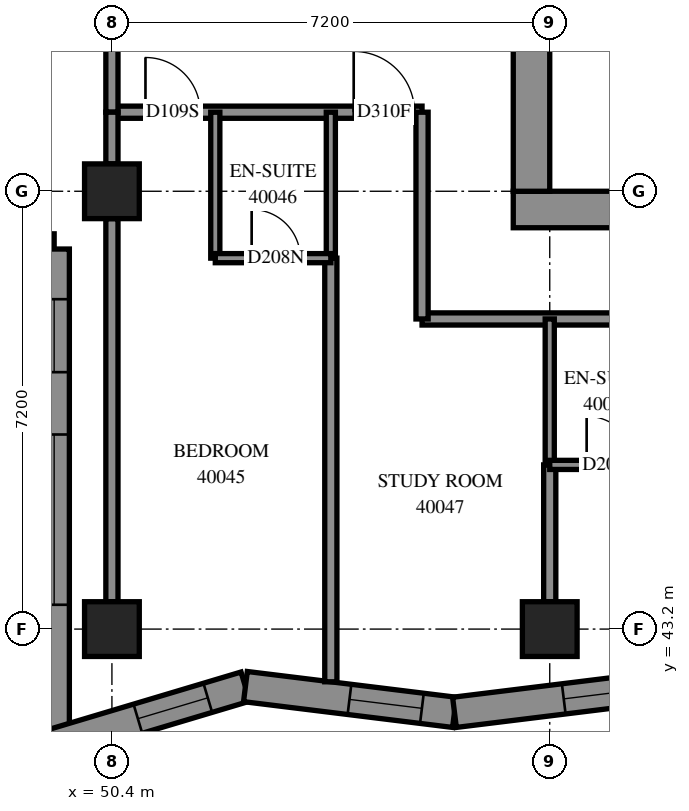
"""IFC4 building model, lengths in metres.
Left out: names, types, materials, properties, quantities, classifications, styles, units other than length and angle.
Written with IfcOpenShell. Run it as: python <this file> out.ifc"""

import sys

from ifc_helpers import new_model, si_unit, direction, frame, frame_2d, origin, origin_2d, place, context, subcontext, project, spatial, polyline, rectangle, outline, extrude, element, fill, save


model = new_model("IFC4")
c1 = context("Model", 3, precision=1e-05, world=origin(), true_north=direction((0.0, 1.0)))
c2 = subcontext(c1, "Body", "Model", "MODEL_VIEW")
j1 = project(units=[si_unit("LENGTHUNIT", "METRE"), si_unit("PLANEANGLEUNIT", "RADIAN")], contexts=[c1])
p1 = place(None, origin())
s1 = spatial("IfcSite", under=j1, at=p1, CompositionType="ELEMENT")
p2 = place(p1, origin())
s2 = spatial("IfcBuilding", under=s1, at=p2, CompositionType="ELEMENT")
p3 = place(p2, frame((0.0, 0.0, 149.0)))
s3 = spatial("IfcBuildingStorey", under=s2, at=p3, CompositionType="ELEMENT", Elevation=149.0)
for number, where, z_axis, x_axis in (
    (1, (50.4, 43.2, 0.0), (0.0, 0.0, 1.0), (1.0, 0.0, 0.0)),
    (2, (50.4, 50.4, 0.0), (0.0, 0.0, 1.0), (1.0, 0.0, 0.0)),
    (3, (57.6, 43.2, 0.0), (0.0, 0.0, 1.0), (1.0, 0.0, 0.0)),
):
    element("IfcColumn", number, at=place(p3, frame(where, z_axis=z_axis, x_axis=x_axis)), inside=s3, PredefinedType="COLUMN", context=c2, shape_type="SweptSolid", body=[
        extrude(rectangle(XDim=0.9, YDim=0.9, at=origin_2d()), origin(), (0.0, 0.0, 1.0), 3.1),
    ])
p4 = place(p3, frame((57.0, 50.1, -0.3), z_axis=(0.0, 0.0, 1.0), x_axis=(1.0, 0.0, 0.0)))
e4 = element("IfcWall", 4, at=p4, inside=s3, PredefinedType="SHEAR", context=c2, shape_type="SweptSolid", body=[
    extrude(rectangle(XDim=15.6, YDim=0.6, at=frame_2d((7.8, 0.0))), origin(), (0.0, 0.0, 1.0), 2.7),
])
p5 = place(p3, frame((57.3, 50.4, -0.3), z_axis=(0.0, 0.0, 1.0), x_axis=(0.0, 1.0, 0.0)))
e5 = element("IfcWall", 5, at=p5, inside=s3, PredefinedType="SHEAR", context=c2, shape_type="SweptSolid", body=[
    extrude(rectangle(XDim=14.4, YDim=0.6, at=frame_2d((7.2, 0.0))), origin(), (0.0, 0.0, 1.0), 2.7),
])
p6 = place(p5, frame((4.55, 0.0, 0.3)))
e6 = element("IfcOpeningElement", 6, at=p6, cuts=e5, PredefinedType="OPENING", context=c2, shape_type="SweptSolid", body=[
    extrude(rectangle(XDim=1.1, YDim=2.1, at=frame_2d((0.55, 1.05))), frame((0.0, 0.31, 0.0), z_axis=(0.0, -1.0, 0.0), x_axis=(1.0, 0.0, 0.0)), (0.0, 0.0, 1.0), 0.62),
])
p7 = place(p5, frame((11.35, 0.0, 0.3)))
e7 = element("IfcOpeningElement", 7, at=p7, cuts=e5, PredefinedType="OPENING", context=c2, shape_type="SweptSolid", body=[
    extrude(rectangle(XDim=1.1, YDim=2.1, at=frame_2d((0.55, 1.05))), frame((0.0, 0.31, 0.0), z_axis=(0.0, -1.0, 0.0), x_axis=(1.0, 0.0, 0.0)), (0.0, 0.0, 1.0), 0.62),
])
p8 = place(p3, frame((42.25, 49.45, 0.0), z_axis=(0.0, 0.0, 1.0), x_axis=(1.0, 0.0, 0.0)))
e8 = element("IfcWall", 8, at=p8, inside=s3, PredefinedType="SOLIDWALL", context=c2, shape_type="SweptSolid", body=[
    extrude(outline(polyline([(-0.25, -0.25), (6.95, -0.25), (7.45, 0.25), (0.25, 0.25), (-0.25, -0.25)])), origin(), (0.0, 0.0, 1.0), 3.1),
])
p9 = place(p8, frame((1.35, 0.0, 0.45)))
e9 = element("IfcOpeningElement", 9, at=p9, cuts=e8, PredefinedType="OPENING", context=c2, shape_type="SweptSolid", body=[
    extrude(rectangle(XDim=2.8, YDim=2.5, at=frame_2d((1.4, 1.25))), frame((0.0, 0.26, 0.0), z_axis=(0.0, -1.0, 0.0), x_axis=(1.0, 0.0, 0.0)), (0.0, 0.0, 1.0), 0.52),
])
p10 = place(p8, frame((5.175, 0.0, 0.45)))
e10 = element("IfcOpeningElement", 10, at=p10, cuts=e8, PredefinedType="OPENING", context=c2, shape_type="SweptSolid", body=[
    extrude(rectangle(XDim=1.2, YDim=2.5, at=frame_2d((0.6, 1.25))), frame((0.0, 0.26, 0.0), z_axis=(0.0, -1.0, 0.0), x_axis=(1.0, 0.0, 0.0)), (0.0, 0.0, 1.0), 0.52),
])
p11 = place(p3, frame((49.45, 49.45, 0.0), z_axis=(0.0, 0.0, 1.0), x_axis=(0.0, -1.0, 0.0)))
e11 = element("IfcWall", 11, at=p11, inside=s3, PredefinedType="SOLIDWALL", context=c2, shape_type="SweptSolid", body=[
    extrude(outline(polyline([(0.25, -0.25), (8.471, -0.25), (7.8, 0.25), (-0.25, 0.25), (0.25, -0.25)])), origin(), (0.0, 0.0, 1.0), 3.1),
])
p12 = place(p11, frame((3.05, 0.0, 0.45)))
e12 = element("IfcOpeningElement", 12, at=p12, cuts=e11, PredefinedType="OPENING", context=c2, shape_type="SweptSolid", body=[
    extrude(rectangle(XDim=2.8, YDim=2.5, at=frame_2d((1.4, 1.25))), frame((0.0, 0.26, 0.0), z_axis=(0.0, -1.0, 0.0), x_axis=(1.0, 0.0, 0.0)), (0.0, 0.0, 1.0), 0.52),
])
p13 = place(p11, frame((0.825, 0.0, 0.45)))
e13 = element("IfcOpeningElement", 13, at=p13, cuts=e11, PredefinedType="OPENING", context=c2, shape_type="SweptSolid", body=[
    extrude(rectangle(XDim=1.2, YDim=2.5, at=frame_2d((0.6, 1.25))), frame((0.0, 0.26, 0.0), z_axis=(0.0, -1.0, 0.0), x_axis=(1.0, 0.0, 0.0)), (0.0, 0.0, 1.0), 0.52),
])
p14 = place(p3, frame((49.45, 41.315, 0.0), z_axis=(0.0, 0.0, 1.0), x_axis=(0.9581326082, 0.2863248246, 0.0)))
e14 = element("IfcWall", 14, at=p14, inside=s3, PredefinedType="SOLIDWALL", context=c2, shape_type="SweptSolid", body=[
    extrude(outline(polyline([(-0.336, -0.25), (3.23, -0.25), (3.335, 0.25), (0.336, 0.25), (-0.336, -0.25)])), origin(), (0.0, 0.0, 1.0), 3.1),
])
p15 = place(p14, frame((1.437, 0.0, 0.45)))
e15 = element("IfcOpeningElement", 15, at=p15, cuts=e14, PredefinedType="OPENING", context=c2, shape_type="SweptSolid", body=[
    extrude(rectangle(XDim=1.2, YDim=2.5, at=frame_2d((0.6, 1.25))), frame((0.0, 0.26, 0.0), z_axis=(0.0, -1.0, 0.0), x_axis=(1.0, 0.0, 0.0)), (0.0, 0.0, 1.0), 0.52),
])
p16 = place(p3, frame((52.595, 42.255, 0.0), z_axis=(0.0, 0.0, 1.0), x_axis=(0.9924948483, -0.1222864508, 0.0)))
e16 = element("IfcWall", 16, at=p16, inside=s3, PredefinedType="SOLIDWALL", context=c2, shape_type="SweptSolid", body=[
    extrude(outline(polyline([(0.052, -0.25), (3.495, -0.25), (3.433, 0.25), (-0.052, 0.25), (0.052, -0.25)])), origin(), (0.0, 0.0, 1.0), 3.1),
])
p17 = place(p16, frame((1.724, 0.0, 0.45)))
e17 = element("IfcOpeningElement", 17, at=p17, cuts=e16, PredefinedType="OPENING", context=c2, shape_type="SweptSolid", body=[
    extrude(rectangle(XDim=1.2, YDim=2.5, at=frame_2d((0.6, 1.25))), frame((0.0, 0.26, 0.0), z_axis=(0.0, -1.0, 0.0), x_axis=(1.0, 0.0, 0.0)), (0.0, 0.0, 1.0), 0.52),
])
p18 = place(p3, frame((56.033, 41.831, 0.0), z_axis=(0.0, 0.0, 1.0), x_axis=(0.9924939881, 0.122293432, 0.0)))
e18 = element("IfcWall", 18, at=p18, inside=s3, PredefinedType="SOLIDWALL", context=c2, shape_type="SweptSolid", body=[
    extrude(outline(polyline([(-0.031, -0.25), (3.412, -0.25), (3.473, 0.25), (0.031, 0.25), (-0.031, -0.25)])), origin(), (0.0, 0.0, 1.0), 3.1),
])
p19 = place(p18, frame((1.81, 0.0, 0.45)))
e19 = element("IfcOpeningElement", 19, at=p19, cuts=e18, PredefinedType="OPENING", context=c2, shape_type="SweptSolid", body=[
    extrude(rectangle(XDim=1.2, YDim=2.5, at=frame_2d((0.6, 1.25))), frame((0.0, 0.26, 0.0), z_axis=(0.0, -1.0, 0.0), x_axis=(1.0, 0.0, 0.0)), (0.0, 0.0, 1.0), 0.52),
])
p20 = place(p3, frame((55.5, 48.3, 0.0), z_axis=(0.0, 0.0, 1.0), x_axis=(1.0, 0.0, 0.0)))
e20 = element("IfcWall", 20, at=p20, inside=s3, PredefinedType="PARTITIONING", context=c2, shape_type="SweptSolid", body=[
    extrude(rectangle(XDim=18.974, YDim=0.2, at=frame_2d((9.487, 0.0))), origin(), (0.0, 0.0, 1.0), 3.1),
])
p21 = place(p20, frame((4.4, 0.0, 0.0)))
e21 = element("IfcOpeningElement", 21, at=p21, cuts=e20, PredefinedType="OPENING", context=c2, shape_type="SweptSolid", body=[
    extrude(rectangle(XDim=0.9, YDim=2.1, at=frame_2d((0.45, 1.05))), frame((0.0, 0.11, 0.0), z_axis=(0.0, -1.0, 0.0), x_axis=(1.0, 0.0, 0.0)), (0.0, 0.0, 1.0), 0.22),
])
p22 = place(p20, frame((6.1, 0.0, 0.0)))
e22 = element("IfcOpeningElement", 22, at=p22, cuts=e20, PredefinedType="OPENING", context=c2, shape_type="SweptSolid", body=[
    extrude(rectangle(XDim=0.9, YDim=2.1, at=frame_2d((0.45, 1.05))), frame((0.0, 0.11, 0.0), z_axis=(0.0, -1.0, 0.0), x_axis=(1.0, 0.0, 0.0)), (0.0, 0.0, 1.0), 0.22),
])
p23 = place(p20, frame((13.162, 0.0, 0.0)))
e23 = element("IfcOpeningElement", 23, at=p23, cuts=e20, PredefinedType="OPENING", context=c2, shape_type="SweptSolid", body=[
    extrude(rectangle(XDim=1.0, YDim=2.1, at=frame_2d((0.5, 1.05))), frame((0.0, 0.11, 0.0), z_axis=(0.0, -1.0, 0.0), x_axis=(1.0, 0.0, 0.0)), (0.0, 0.0, 1.0), 0.22),
])
p24 = place(p3, frame((54.0, 42.333, 0.0), z_axis=(0.0, 0.0, 1.0), x_axis=(0.0, 1.0, 0.0)))
e24 = element("IfcWall", 24, at=p24, inside=s3, PredefinedType="PARTITIONING", context=c2, shape_type="SweptSolid", body=[
    extrude(rectangle(XDim=6.967, YDim=0.2, at=frame_2d((3.483, 0.0))), origin(), (0.0, 0.0, 1.0), 3.1),
])
p25 = place(p3, frame((50.4, 43.65, 0.0), z_axis=(0.0, 0.0, 1.0), x_axis=(0.0, 1.0, 0.0)))
e25 = element("IfcWall", 25, at=p25, inside=s3, PredefinedType="PARTITIONING", context=c2, shape_type="SweptSolid", body=[
    extrude(rectangle(XDim=6.3, YDim=0.2, at=frame_2d((3.15, 0.0))), origin(), (0.0, 0.0, 1.0), 2.6),
])
p26 = place(p3, frame((50.4, 51.7, 0.0), z_axis=(0.0, 0.0, 1.0), x_axis=(1.0, 0.0, 0.0)))
e26 = element("IfcWall", 26, at=p26, inside=s3, PredefinedType="PARTITIONING", context=c2, shape_type="SweptSolid", body=[
    extrude(rectangle(XDim=5.1, YDim=0.2, at=frame_2d((2.55, 0.0))), origin(), (0.0, 0.0, 1.0), 3.1),
])
p27 = place(p26, frame((0.552, 0.0, 0.0)))
e27 = element("IfcOpeningElement", 27, at=p27, cuts=e26, PredefinedType="OPENING", context=c2, shape_type="SweptSolid", body=[
    extrude(rectangle(XDim=0.9, YDim=2.1, at=frame_2d((0.45, 1.05))), frame((0.0, 0.11, 0.0), z_axis=(0.0, -1.0, 0.0), x_axis=(1.0, 0.0, 0.0)), (0.0, 0.0, 1.0), 0.22),
])
p28 = place(p26, frame((3.976, 0.0, 0.0)))
e28 = element("IfcOpeningElement", 28, at=p28, cuts=e26, PredefinedType="OPENING", context=c2, shape_type="SweptSolid", body=[
    extrude(rectangle(XDim=1.0, YDim=2.1, at=frame_2d((0.5, 1.05))), frame((0.0, 0.11, 0.0), z_axis=(0.0, -1.0, 0.0), x_axis=(1.0, 0.0, 0.0)), (0.0, 0.0, 1.0), 0.22),
])
p29 = place(p3, frame((55.5, 48.3, 0.0), z_axis=(0.0, 0.0, 1.0), x_axis=(0.0, 1.0, 0.0)))
e29 = element("IfcWall", 29, at=p29, inside=s3, PredefinedType="PARTITIONING", context=c2, shape_type="SweptSolid", body=[
    extrude(rectangle(XDim=3.4, YDim=0.2, at=frame_2d((1.7, 0.0))), origin(), (0.0, 0.0, 1.0), 3.1),
])
for number, where, z_axis, x_axis in (
    (30, (52.1, 49.3, 0.0), (0.0, 0.0, 1.0), (0.0, 1.0, 0.0)),
    (31, (54.0, 49.3, 0.0), (0.0, 0.0, 1.0), (0.0, 1.0, 0.0)),
    (32, (57.6, 45.9, 0.0), (0.0, 0.0, 1.0), (0.0, 1.0, 0.0)),
):
    element("IfcWall", number, at=place(p3, frame(where, z_axis=z_axis, x_axis=x_axis)), inside=s3, PredefinedType="PARTITIONING", context=c2, shape_type="SweptSolid", body=[
        extrude(rectangle(XDim=2.4, YDim=0.15, at=frame_2d((1.2, 0.0))), origin(), (0.0, 0.0, 1.0), 3.1),
    ])
p30 = place(p3, frame((57.6, 43.65, 0.0), z_axis=(0.0, 0.0, 1.0), x_axis=(0.0, 1.0, 0.0)))
e33 = element("IfcWall", 33, at=p30, inside=s3, PredefinedType="PARTITIONING", context=c2, shape_type="SweptSolid", body=[
    extrude(rectangle(XDim=2.25, YDim=0.2, at=frame_2d((1.125, 0.0))), origin(), (0.0, 0.0, 1.0), 3.1),
])
p31 = place(p3, frame((50.4, 51.7, 0.0), z_axis=(0.0, 0.0, 1.0), x_axis=(0.0, 1.0, 0.0)))
e34 = element("IfcWall", 34, at=p31, inside=s3, PredefinedType="PARTITIONING", context=c2, shape_type="SweptSolid", body=[
    extrude(rectangle(XDim=2.2, YDim=0.2, at=frame_2d((1.1, 0.0))), origin(), (0.0, 0.0, 1.0), 3.1),
])
p32 = place(p3, frame((52.1, 49.3, 0.0), z_axis=(0.0, 0.0, 1.0), x_axis=(1.0, 0.0, 0.0)))
e35 = element("IfcWall", 35, at=p32, inside=s3, PredefinedType="PARTITIONING", context=c2, shape_type="SweptSolid", body=[
    extrude(rectangle(XDim=1.9, YDim=0.15, at=frame_2d((0.95, 0.0))), origin(), (0.0, 0.0, 1.0), 3.1),
])
p33 = place(p32, frame((0.598, 0.0, 0.0)))
e36 = element("IfcOpeningElement", 36, at=p33, cuts=e35, PredefinedType="OPENING", context=c2, shape_type="SweptSolid", body=[
    extrude(rectangle(XDim=0.8, YDim=2.1, at=frame_2d((0.4, 1.05))), frame((0.0, 0.085, 0.0), z_axis=(0.0, -1.0, 0.0), x_axis=(1.0, 0.0, 0.0)), (0.0, 0.0, 1.0), 0.17),
])
p34 = place(p3, frame((57.6, 45.9, 0.0), z_axis=(0.0, 0.0, 1.0), x_axis=(1.0, 0.0, 0.0)))
e37 = element("IfcWall", 37, at=p34, inside=s3, PredefinedType="PARTITIONING", context=c2, shape_type="SweptSolid", body=[
    extrude(rectangle(XDim=1.9, YDim=0.15, at=frame_2d((0.95, 0.0))), origin(), (0.0, 0.0, 1.0), 3.1),
])
p35 = place(p34, frame((0.607, 0.0, 0.0)))
e38 = element("IfcOpeningElement", 38, at=p35, cuts=e37, PredefinedType="OPENING", context=c2, shape_type="SweptSolid", body=[
    extrude(rectangle(XDim=0.8, YDim=2.1, at=frame_2d((0.4, 1.05))), frame((0.0, 0.085, 0.0), z_axis=(0.0, -1.0, 0.0), x_axis=(1.0, 0.0, 0.0)), (0.0, 0.0, 1.0), 0.17),
])
p36 = place(p3, frame((50.4, 50.85, 0.0), z_axis=(0.0, 0.0, 1.0), x_axis=(0.0, 1.0, 0.0)))
e39 = element("IfcWall", 39, at=p36, inside=s3, PredefinedType="PARTITIONING", context=c2, shape_type="SweptSolid", body=[
    extrude(rectangle(XDim=0.85, YDim=0.2, at=frame_2d((0.425, 0.0))), origin(), (0.0, 0.0, 1.0), 3.1),
])
p37 = place(p12, origin())
e40 = element("IfcWindow", 40, at=p37, inside=s3, PartitioningType="SINGLE_PANEL", PredefinedType="WINDOW", context=c2, shape_type="SweptSolid", body=[
    extrude(rectangle(XDim=2.8, YDim=2.5, at=frame_2d((1.4, 1.25))), frame((0.0, 0.18, 0.0), z_axis=(0.0, -1.0, 0.0), x_axis=(1.0, 0.0, 0.0)), (0.0, 0.0, 1.0), 0.06),
])
fill(e12, e40)
p38 = place(p13, origin())
e41 = element("IfcWindow", 41, at=p38, inside=s3, PartitioningType="SINGLE_PANEL", PredefinedType="WINDOW", context=c2, shape_type="SweptSolid", body=[
    extrude(rectangle(XDim=1.2, YDim=2.5, at=frame_2d((0.6, 1.25))), frame((0.0, 0.18, 0.0), z_axis=(0.0, -1.0, 0.0), x_axis=(1.0, 0.0, 0.0)), (0.0, 0.0, 1.0), 0.06),
])
fill(e13, e41)
p39 = place(p15, origin())
e42 = element("IfcWindow", 42, at=p39, inside=s3, PartitioningType="SINGLE_PANEL", PredefinedType="WINDOW", context=c2, shape_type="SweptSolid", body=[
    extrude(rectangle(XDim=1.2, YDim=2.5, at=frame_2d((0.6, 1.25))), frame((0.0, 0.18, 0.0), z_axis=(0.0, -1.0, 0.0), x_axis=(1.0, 0.0, 0.0)), (0.0, 0.0, 1.0), 0.06),
])
fill(e15, e42)
p40 = place(p17, origin())
e43 = element("IfcWindow", 43, at=p40, inside=s3, PartitioningType="SINGLE_PANEL", PredefinedType="WINDOW", context=c2, shape_type="SweptSolid", body=[
    extrude(rectangle(XDim=1.2, YDim=2.5, at=frame_2d((0.6, 1.25))), frame((0.0, 0.18, 0.0), z_axis=(0.0, -1.0, 0.0), x_axis=(1.0, 0.0, 0.0)), (0.0, 0.0, 1.0), 0.06),
])
fill(e17, e43)
p41 = place(p19, origin())
e44 = element("IfcWindow", 44, at=p41, inside=s3, PartitioningType="SINGLE_PANEL", PredefinedType="WINDOW", context=c2, shape_type="SweptSolid", body=[
    extrude(rectangle(XDim=1.2, YDim=2.5, at=frame_2d((0.6, 1.25))), frame((0.0, 0.18, 0.0), z_axis=(0.0, -1.0, 0.0), x_axis=(1.0, 0.0, 0.0)), (0.0, 0.0, 1.0), 0.06),
])
fill(e19, e44)
p42 = place(p27, origin())
e45 = element("IfcDoor", 45, at=p42, inside=s3, OperationType="SINGLE_SWING_LEFT", PredefinedType="DOOR", context=c2, shape_type="SweptSolid", body=[
    extrude(rectangle(XDim=0.9, YDim=2.1, at=frame_2d((0.45, 1.05))), frame((0.0, 0.025, 0.0), z_axis=(0.0, -1.0, 0.0), x_axis=(1.0, 0.0, 0.0)), (0.0, 0.0, 1.0), 0.05),
])
fill(e27, e45)
p43 = place(p33, origin())
e46 = element("IfcDoor", 46, at=p43, inside=s3, OperationType="SINGLE_SWING_RIGHT", PredefinedType="DOOR", context=c2, shape_type="SweptSolid", body=[
    extrude(rectangle(XDim=0.8, YDim=2.1, at=frame_2d((0.4, 1.05))), frame((0.0, 0.025, 0.0), z_axis=(0.0, -1.0, 0.0), x_axis=(1.0, 0.0, 0.0)), (0.0, 0.0, 1.0), 0.05),
])
fill(e36, e46)
p44 = place(p28, origin())
e47 = element("IfcDoor", 47, at=p44, inside=s3, OperationType="SINGLE_SWING_RIGHT", PredefinedType="DOOR", context=c2, shape_type="SweptSolid", body=[
    extrude(rectangle(XDim=1.0, YDim=2.1, at=frame_2d((0.5, 1.05))), frame((0.0, 0.025, 0.0), z_axis=(0.0, -1.0, 0.0), x_axis=(1.0, 0.0, 0.0)), (0.0, 0.0, 1.0), 0.05),
])
fill(e28, e47)
p45 = place(p35, origin())
e48 = element("IfcDoor", 48, at=p45, inside=s3, OperationType="SINGLE_SWING_RIGHT", PredefinedType="DOOR", context=c2, shape_type="SweptSolid", body=[
    extrude(rectangle(XDim=0.8, YDim=2.1, at=frame_2d((0.4, 1.05))), frame((0.0, 0.025, 0.0), z_axis=(0.0, -1.0, 0.0), x_axis=(1.0, 0.0, 0.0)), (0.0, 0.0, 1.0), 0.05),
])
fill(e38, e48)
save(model, sys.argv[1])
